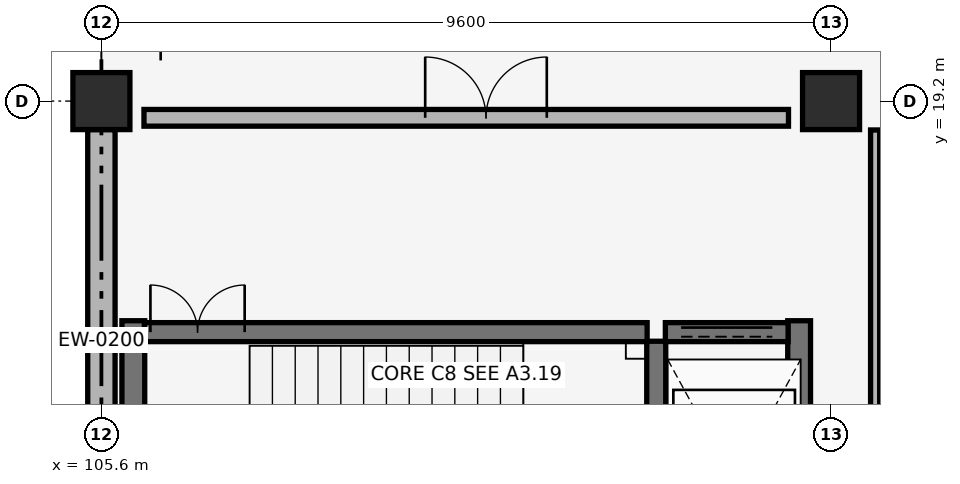
"""IFC4 building model, lengths in metres.
Left out: names, types, materials, properties, quantities, classifications, styles, units other than length and angle.
Written with IfcOpenShell. Run it as: python <this file> out.ifc"""

import sys

from ifc_helpers import new_model, si_unit, direction, frame, frame_2d, origin, origin_2d, place, context, subcontext, project, spatial, rectangle, circle, extrude, element, fill, save


model = new_model("IFC4")
c1 = context("Model", 3, precision=1e-05, world=origin(), true_north=direction((0.0, 1.0)))
c2 = subcontext(c1, "Body", "Model", "MODEL_VIEW")
j1 = project(units=[si_unit("LENGTHUNIT", "METRE"), si_unit("PLANEANGLEUNIT", "RADIAN")], contexts=[c1])
p1 = place(None, origin())
s1 = spatial("IfcSite", under=j1, at=p1, CompositionType="ELEMENT")
p2 = place(p1, origin())
s2 = spatial("IfcBuilding", under=s1, at=p2, CompositionType="ELEMENT")
p3 = place(p2, origin())
s3 = spatial("IfcBuildingStorey", under=s2, at=p3, CompositionType="ELEMENT", Elevation=0.0)
for number, where, z_axis, x_axis in (
    (1, (105.6, 19.2, -0.44), (0.0, 0.0, 1.0), (1.0, 0.0, 0.0)),
    (2, (115.2, 19.2, -0.44), (0.0, 0.0, 1.0), (1.0, 0.0, 0.0)),
):
    element("IfcColumn", number, at=place(p3, frame(where, z_axis=z_axis, x_axis=x_axis)), inside=s3, PredefinedType="COLUMN", context=c2, shape_type="SweptSolid", body=[
        extrude(circle(Radius=0.375, at=origin_2d()), origin(), (0.0, 0.0, 1.0), 4.86),
    ])
p4 = place(p3, frame((105.6, 18.825, 0.0), z_axis=(0.0, 0.0, 1.0), x_axis=(0.0, -1.0, 0.0)))
e3 = element("IfcWall", 3, at=p4, inside=s3, PredefinedType="SOLIDWALL", context=c2, shape_type="SweptSolid", body=[
    extrude(rectangle(XDim=6.45, YDim=0.36, at=frame_2d((3.225, 0.0))), origin(), (0.0, 0.0, 1.0), 3.4),
])
for number, where, z_axis, x_axis in (
    (4, (106.02, 12.21, 0.0), (0.0, 0.0, 1.0), (0.0, 1.0, 0.0)),
    (5, (114.78, 12.21, 0.0), (0.0, 0.0, 1.0), (0.0, 1.0, 0.0)),
):
    element("IfcWall", number, at=place(p3, frame(where, z_axis=z_axis, x_axis=x_axis)), inside=s3, PredefinedType="SHEAR", context=c2, shape_type="SweptSolid", body=[
        extrude(rectangle(XDim=4.1, YDim=0.3, at=frame_2d((2.05, 0.0))), origin(), (0.0, 0.0, 1.0), 4.12),
    ])
p5 = place(p3, frame((112.9, 12.51, 0.0), z_axis=(0.0, 0.0, 1.0), x_axis=(0.0, 1.0, 0.0)))
e6 = element("IfcWall", 6, at=p5, inside=s3, PredefinedType="SHEAR", context=c2, shape_type="SweptSolid", body=[
    extrude(rectangle(XDim=3.53, YDim=0.25, at=frame_2d((1.765, 0.0))), origin(), (0.0, 0.0, 1.0), 4.12),
])
p6 = place(p3, frame((106.165, 16.16, 0.0), z_axis=(0.0, 0.0, 1.0), x_axis=(1.0, 0.0, 0.0)))
e7 = element("IfcWall", 7, at=p6, inside=s3, PredefinedType="SHEAR", context=c2, shape_type="SweptSolid", body=[
    extrude(rectangle(XDim=6.615, YDim=0.25, at=frame_2d((3.308, 0.0))), origin(), (0.0, 0.0, 1.0), 4.12),
])
p7 = place(p6, frame((0.08, 0.0, 0.0)))
e8 = element("IfcOpeningElement", 8, at=p7, cuts=e7, PredefinedType="OPENING", context=c2, shape_type="SweptSolid", body=[
    extrude(rectangle(XDim=1.24, YDim=2.15, at=frame_2d((0.62, 1.075))), frame((0.0, 0.135, 0.0), z_axis=(0.0, -1.0, 0.0), x_axis=(1.0, 0.0, 0.0)), (0.0, 0.0, 1.0), 0.27),
])
p8 = place(p3, frame((106.16, 18.98, 0.0), z_axis=(0.0, 0.0, 1.0), x_axis=(1.0, 0.0, 0.0)))
e9 = element("IfcWall", 9, at=p8, inside=s3, PredefinedType="PARTITIONING", context=c2, shape_type="SweptSolid", body=[
    extrude(rectangle(XDim=8.48, YDim=0.22, at=frame_2d((4.24, 0.0))), origin(), (0.0, 0.0, 1.0), 3.4),
])
p9 = place(p8, frame((3.7, 0.0, 0.0)))
e10 = element("IfcOpeningElement", 10, at=p9, cuts=e9, PredefinedType="OPENING", context=c2, shape_type="SweptSolid", body=[
    extrude(rectangle(XDim=1.6, YDim=2.2, at=frame_2d((0.8, 1.1))), frame((0.0, 0.12, 0.0), z_axis=(0.0, -1.0, 0.0), x_axis=(1.0, 0.0, 0.0)), (0.0, 0.0, 1.0), 0.24),
])
p10 = place(p3, frame((113.02, 16.16, 0.0), z_axis=(0.0, 0.0, 1.0), x_axis=(1.0, 0.0, 0.0)))
e11 = element("IfcWall", 11, at=p10, inside=s3, PredefinedType="SHEAR", context=c2, shape_type="SweptSolid", body=[
    extrude(rectangle(XDim=1.615, YDim=0.25, at=frame_2d((0.808, 0.0))), origin(), (0.0, 0.0, 1.0), 4.12),
])
p11 = place(p10, frame((0.208, 0.0, 0.0)))
e12 = element("IfcOpeningElement", 12, at=p11, cuts=e11, PredefinedType="OPENING", context=c2, shape_type="SweptSolid", body=[
    extrude(rectangle(XDim=1.2, YDim=2.15, at=frame_2d((0.6, 1.075))), frame((0.0, 0.135, 0.0), z_axis=(0.0, -1.0, 0.0), x_axis=(1.0, 0.0, 0.0)), (0.0, 0.0, 1.0), 0.27),
])
p12 = place(p3, frame((115.78, 0.182, 0.0), z_axis=(0.0, 0.0, 1.0), x_axis=(0.0, 1.0, 0.0)))
e13 = element("IfcWall", 13, at=p12, inside=s3, PredefinedType="PARTITIONING", context=c2, shape_type="SweptSolid", body=[
    extrude(rectangle(XDim=18.638, YDim=0.12, at=frame_2d((9.319, 0.0))), origin(), (0.0, 0.0, 1.0), 3.4),
])
p13 = place(p12, frame((8.819, 0.0, 0.0)))
e14 = element("IfcOpeningElement", 14, at=p13, cuts=e13, PredefinedType="OPENING", context=c2, shape_type="SweptSolid", body=[
    extrude(rectangle(XDim=1.0, YDim=2.1, at=frame_2d((0.5, 1.05))), frame((0.0, 0.07, 0.0), z_axis=(0.0, -1.0, 0.0), x_axis=(1.0, 0.0, 0.0)), (0.0, 0.0, 1.0), 0.14),
])
p14 = place(p7, origin())
e15 = element("IfcDoor", 15, at=p14, inside=s3, OperationType="DOUBLE_DOOR_SINGLE_SWING", PredefinedType="DOOR", context=c2, shape_type="SweptSolid", body=[
    extrude(rectangle(XDim=1.24, YDim=2.15, at=frame_2d((0.62, 1.075))), frame((0.0, 0.025, 0.0), z_axis=(0.0, -1.0, 0.0), x_axis=(1.0, 0.0, 0.0)), (0.0, 0.0, 1.0), 0.05),
])
fill(e8, e15)
p15 = place(p9, origin())
e16 = element("IfcDoor", 16, at=p15, inside=s3, OperationType="DOUBLE_DOOR_SINGLE_SWING", PredefinedType="DOOR", context=c2, shape_type="SweptSolid", body=[
    extrude(rectangle(XDim=1.6, YDim=2.2, at=frame_2d((0.8, 1.1))), frame((0.0, 0.025, 0.0), z_axis=(0.0, -1.0, 0.0), x_axis=(1.0, 0.0, 0.0)), (0.0, 0.0, 1.0), 0.05),
])
fill(e10, e16)
p16 = place(p11, origin())
e17 = element("IfcDoor", 17, at=p16, inside=s3, OperationType="DOUBLE_DOOR_SLIDING", PredefinedType="DOOR", context=c2, shape_type="SweptSolid", body=[
    extrude(rectangle(XDim=1.2, YDim=2.15, at=frame_2d((0.6, 1.075))), frame((0.0, 0.025, 0.0), z_axis=(0.0, -1.0, 0.0), x_axis=(1.0, 0.0, 0.0)), (0.0, 0.0, 1.0), 0.05),
])
fill(e12, e17)
save(model, sys.argv[1])
